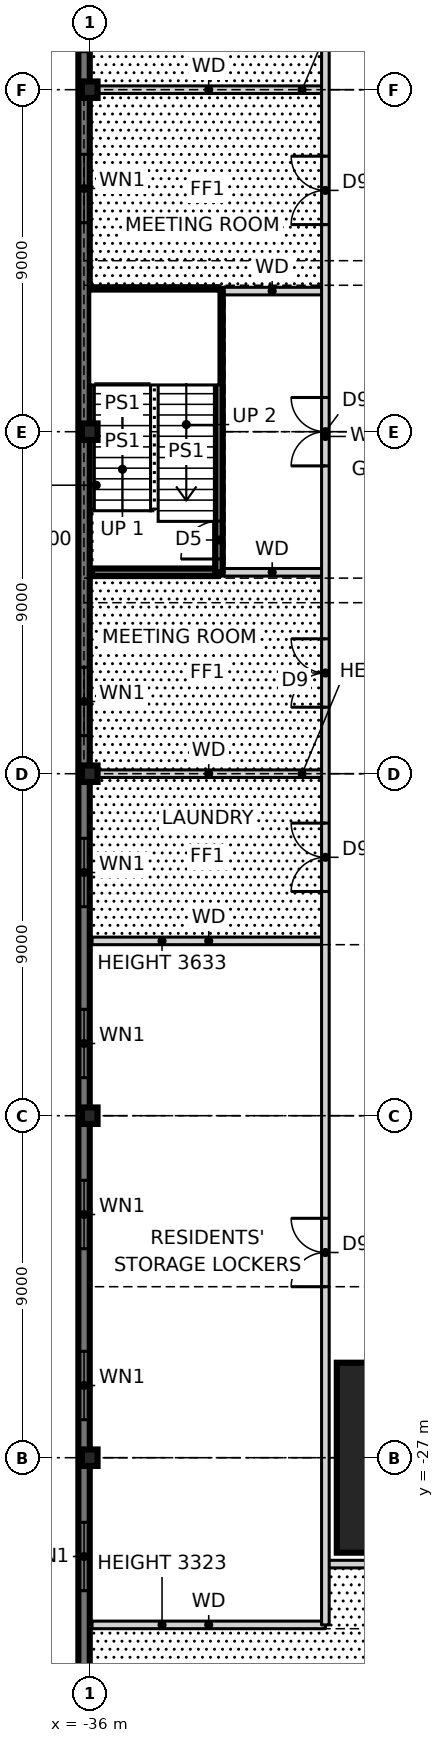
"""IFC4 building model, lengths in metres.
Left out: names, types, materials, properties, quantities, classifications, styles, units other than length and angle.
Written with IfcOpenShell. Run it as: python <this file> out.ifc"""

import sys

from ifc_helpers import new_model, si_unit, direction, frame, frame_2d, origin, origin_2d, place, context, subcontext, project, spatial, rectangle, i_section, extrude, element, fill, save


model = new_model("IFC4")
c1 = context("Model", 3, precision=1e-05, world=origin(), true_north=direction((0.0, 1.0)))
c2 = subcontext(c1, "Body", "Model", "MODEL_VIEW")
j1 = project(units=[si_unit("LENGTHUNIT", "METRE"), si_unit("PLANEANGLEUNIT", "RADIAN")], contexts=[c1])
p1 = place(None, origin())
s1 = spatial("IfcSite", under=j1, at=p1, CompositionType="ELEMENT")
p2 = place(p1, origin())
s2 = spatial("IfcBuilding", under=s1, at=p2, CompositionType="ELEMENT")
p3 = place(p2, frame((0.0, 0.0, 6.0)))
s3 = spatial("IfcBuildingStorey", under=s2, at=p3, CompositionType="ELEMENT", Elevation=6.0)
p4 = place(p3, frame((-27.0, -27.0, 0.0), z_axis=(0.0, 0.0, 1.0), x_axis=(1.0, 0.0, 0.0)))
e1 = element("IfcColumn", 1, at=p4, inside=s3, PredefinedType="COLUMN", context=c2, shape_type="SweptSolid", body=[
    extrude(rectangle(XDim=5.0, YDim=5.0, at=origin_2d()), origin(), (0.0, 0.0, 1.0), 4.5),
    extrude(i_section(OverallWidth=0.478, OverallDepth=0.599, WebThickness=0.1, FlangeThickness=0.14, at=origin_2d()), origin(), (0.0, 0.0, 1.0), 4.5),
])
for number, where, z_axis, x_axis in (
    (2, (-36.0, -27.0, 0.0), (0.0, 0.0, 1.0), (1.0, 0.0, 0.0)),
    (3, (-36.0, -18.0, 0.0), (0.0, 0.0, 1.0), (1.0, 0.0, 0.0)),
    (4, (-36.0, -9.0, 0.0), (0.0, 0.0, 1.0), (1.0, 0.0, 0.0)),
    (5, (-36.0, 0.0, 0.0), (0.0, 0.0, 1.0), (1.0, 0.0, 0.0)),
    (6, (-36.0, 9.0, 0.0), (0.0, 0.0, 1.0), (1.0, 0.0, 0.0)),
):
    element("IfcColumn", number, at=place(p3, frame(where, z_axis=z_axis, x_axis=x_axis)), inside=s3, PredefinedType="COLUMN", context=c2, shape_type="SweptSolid", body=[
        extrude(i_section(OverallWidth=0.411, OverallDepth=0.434, WebThickness=0.036, FlangeThickness=0.057, at=origin_2d()), origin(), (0.0, 0.0, 1.0), 4.5),
    ])
p5 = place(p3, frame((-36.15, 36.3, -0.25), z_axis=(0.0, 0.0, 1.0), x_axis=(0.0, -1.0, 0.0)))
e7 = element("IfcWall", 7, at=p5, inside=s3, PredefinedType="SOLIDWALL", context=c2, shape_type="SweptSolid", body=[
    extrude(rectangle(XDim=72.6, YDim=0.3, at=frame_2d((36.3, 0.0))), origin(), (0.0, 0.0, 1.0), 3.73),
])
p6 = place(p5, frame((2.0, 0.0, 1.15)))
e8 = element("IfcOpeningElement", 8, at=p6, cuts=e7, PredefinedType="OPENING", context=c2, shape_type="SweptSolid", body=[
    extrude(rectangle(XDim=1.8, YDim=2.4, at=frame_2d((0.9, 1.2))), frame((0.0, 0.16, 0.0), z_axis=(0.0, -1.0, 0.0), x_axis=(1.0, 0.0, 0.0)), (0.0, 0.0, 1.0), 0.32),
])
p7 = place(p5, frame((6.5, 0.0, 1.15)))
e9 = element("IfcOpeningElement", 9, at=p7, cuts=e7, PredefinedType="OPENING", context=c2, shape_type="SweptSolid", body=[
    extrude(rectangle(XDim=1.8, YDim=2.4, at=frame_2d((0.9, 1.2))), frame((0.0, 0.16, 0.0), z_axis=(0.0, -1.0, 0.0), x_axis=(1.0, 0.0, 0.0)), (0.0, 0.0, 1.0), 0.32),
])
p8 = place(p5, frame((11.0, 0.0, 1.15)))
e10 = element("IfcOpeningElement", 10, at=p8, cuts=e7, PredefinedType="OPENING", context=c2, shape_type="SweptSolid", body=[
    extrude(rectangle(XDim=1.8, YDim=2.4, at=frame_2d((0.9, 1.2))), frame((0.0, 0.16, 0.0), z_axis=(0.0, -1.0, 0.0), x_axis=(1.0, 0.0, 0.0)), (0.0, 0.0, 1.0), 0.32),
])
p9 = place(p5, frame((15.5, 0.0, 1.15)))
e11 = element("IfcOpeningElement", 11, at=p9, cuts=e7, PredefinedType="OPENING", context=c2, shape_type="SweptSolid", body=[
    extrude(rectangle(XDim=1.8, YDim=2.4, at=frame_2d((0.9, 1.2))), frame((0.0, 0.16, 0.0), z_axis=(0.0, -1.0, 0.0), x_axis=(1.0, 0.0, 0.0)), (0.0, 0.0, 1.0), 0.32),
])
p10 = place(p5, frame((20.0, 0.0, 1.15)))
e12 = element("IfcOpeningElement", 12, at=p10, cuts=e7, PredefinedType="OPENING", context=c2, shape_type="SweptSolid", body=[
    extrude(rectangle(XDim=1.8, YDim=2.4, at=frame_2d((0.9, 1.2))), frame((0.0, 0.16, 0.0), z_axis=(0.0, -1.0, 0.0), x_axis=(1.0, 0.0, 0.0)), (0.0, 0.0, 1.0), 0.32),
])
p11 = place(p5, frame((24.5, 0.0, 1.15)))
e13 = element("IfcOpeningElement", 13, at=p11, cuts=e7, PredefinedType="OPENING", context=c2, shape_type="SweptSolid", body=[
    extrude(rectangle(XDim=1.8, YDim=2.4, at=frame_2d((0.9, 1.2))), frame((0.0, 0.16, 0.0), z_axis=(0.0, -1.0, 0.0), x_axis=(1.0, 0.0, 0.0)), (0.0, 0.0, 1.0), 0.32),
])
p12 = place(p5, frame((29.0, 0.0, 1.15)))
e14 = element("IfcOpeningElement", 14, at=p12, cuts=e7, PredefinedType="OPENING", context=c2, shape_type="SweptSolid", body=[
    extrude(rectangle(XDim=1.8, YDim=2.4, at=frame_2d((0.9, 1.2))), frame((0.0, 0.16, 0.0), z_axis=(0.0, -1.0, 0.0), x_axis=(1.0, 0.0, 0.0)), (0.0, 0.0, 1.0), 0.32),
])
p13 = place(p5, frame((42.5, 0.0, 1.15)))
e15 = element("IfcOpeningElement", 15, at=p13, cuts=e7, PredefinedType="OPENING", context=c2, shape_type="SweptSolid", body=[
    extrude(rectangle(XDim=1.8, YDim=2.4, at=frame_2d((0.9, 1.2))), frame((0.0, 0.16, 0.0), z_axis=(0.0, -1.0, 0.0), x_axis=(1.0, 0.0, 0.0)), (0.0, 0.0, 1.0), 0.32),
])
p14 = place(p5, frame((47.0, 0.0, 1.15)))
e16 = element("IfcOpeningElement", 16, at=p14, cuts=e7, PredefinedType="OPENING", context=c2, shape_type="SweptSolid", body=[
    extrude(rectangle(XDim=1.8, YDim=2.4, at=frame_2d((0.9, 1.2))), frame((0.0, 0.16, 0.0), z_axis=(0.0, -1.0, 0.0), x_axis=(1.0, 0.0, 0.0)), (0.0, 0.0, 1.0), 0.32),
])
p15 = place(p5, frame((51.5, 0.0, 1.15)))
e17 = element("IfcOpeningElement", 17, at=p15, cuts=e7, PredefinedType="OPENING", context=c2, shape_type="SweptSolid", body=[
    extrude(rectangle(XDim=1.8, YDim=2.4, at=frame_2d((0.9, 1.2))), frame((0.0, 0.16, 0.0), z_axis=(0.0, -1.0, 0.0), x_axis=(1.0, 0.0, 0.0)), (0.0, 0.0, 1.0), 0.32),
])
p16 = place(p5, frame((56.0, 0.0, 1.15)))
e18 = element("IfcOpeningElement", 18, at=p16, cuts=e7, PredefinedType="OPENING", context=c2, shape_type="SweptSolid", body=[
    extrude(rectangle(XDim=1.8, YDim=2.4, at=frame_2d((0.9, 1.2))), frame((0.0, 0.16, 0.0), z_axis=(0.0, -1.0, 0.0), x_axis=(1.0, 0.0, 0.0)), (0.0, 0.0, 1.0), 0.32),
])
p17 = place(p5, frame((60.5, 0.0, 1.15)))
e19 = element("IfcOpeningElement", 19, at=p17, cuts=e7, PredefinedType="OPENING", context=c2, shape_type="SweptSolid", body=[
    extrude(rectangle(XDim=1.8, YDim=2.4, at=frame_2d((0.9, 1.2))), frame((0.0, 0.16, 0.0), z_axis=(0.0, -1.0, 0.0), x_axis=(1.0, 0.0, 0.0)), (0.0, 0.0, 1.0), 0.32),
])
p18 = place(p5, frame((65.0, 0.0, 1.15)))
e20 = element("IfcOpeningElement", 20, at=p18, cuts=e7, PredefinedType="OPENING", context=c2, shape_type="SweptSolid", body=[
    extrude(rectangle(XDim=1.8, YDim=2.4, at=frame_2d((0.9, 1.2))), frame((0.0, 0.16, 0.0), z_axis=(0.0, -1.0, 0.0), x_axis=(1.0, 0.0, 0.0)), (0.0, 0.0, 1.0), 0.32),
])
p19 = place(p5, frame((69.5, 0.0, 1.15)))
e21 = element("IfcOpeningElement", 21, at=p19, cuts=e7, PredefinedType="OPENING", context=c2, shape_type="SweptSolid", body=[
    extrude(rectangle(XDim=1.8, YDim=2.4, at=frame_2d((0.9, 1.2))), frame((0.0, 0.16, 0.0), z_axis=(0.0, -1.0, 0.0), x_axis=(1.0, 0.0, 0.0)), (0.0, 0.0, 1.0), 0.32),
])
p20 = place(p3, frame((-35.94, -31.4, 0.0), z_axis=(0.0, 0.0, 1.0), x_axis=(1.0, 0.0, 0.0)))
e22 = element("IfcWall", 22, at=p20, inside=s3, PredefinedType="SOLIDWALL", context=c2, shape_type="SweptSolid", body=[
    extrude(rectangle(XDim=6.14, YDim=0.2, at=frame_2d((3.07, 0.0))), origin(), (0.0, 0.0, 1.0), 3.323),
])
p21 = place(p3, frame((-29.8, -29.8, 0.0), z_axis=(0.0, 0.0, 1.0), x_axis=(1.0, 0.0, 0.0)))
e23 = element("IfcWall", 23, at=p21, inside=s3, PredefinedType="SOLIDWALL", context=c2, shape_type="SweptSolid", body=[
    extrude(rectangle(XDim=59.6, YDim=0.2, at=frame_2d((29.8, 0.0))), origin(), (0.0, 0.0, 1.0), 4.25),
])
p22 = place(p21, frame((8.1, 0.0, 0.0)))
e24 = element("IfcOpeningElement", 24, at=p22, cuts=e23, PredefinedType="OPENING", context=c2, shape_type="SweptSolid", body=[
    extrude(rectangle(XDim=1.8, YDim=2.1, at=frame_2d((0.9, 1.05))), frame((0.0, 0.11, 0.0), z_axis=(0.0, -1.0, 0.0), x_axis=(1.0, 0.0, 0.0)), (0.0, 0.0, 1.0), 0.22),
])
p23 = place(p21, frame((22.9, 0.0, 0.0)))
e25 = element("IfcOpeningElement", 25, at=p23, cuts=e23, PredefinedType="OPENING", context=c2, shape_type="SweptSolid", body=[
    extrude(rectangle(XDim=1.8, YDim=2.1, at=frame_2d((0.9, 1.05))), frame((0.0, 0.11, 0.0), z_axis=(0.0, -1.0, 0.0), x_axis=(1.0, 0.0, 0.0)), (0.0, 0.0, 1.0), 0.22),
])
p24 = place(p21, frame((28.9, 0.0, 0.0)))
e26 = element("IfcOpeningElement", 26, at=p24, cuts=e23, PredefinedType="OPENING", context=c2, shape_type="SweptSolid", body=[
    extrude(rectangle(XDim=1.8, YDim=2.1, at=frame_2d((0.9, 1.05))), frame((0.0, 0.11, 0.0), z_axis=(0.0, -1.0, 0.0), x_axis=(1.0, 0.0, 0.0)), (0.0, 0.0, 1.0), 0.22),
])
p25 = place(p21, frame((33.2, 0.0, 0.0)))
e27 = element("IfcOpeningElement", 27, at=p25, cuts=e23, PredefinedType="OPENING", context=c2, shape_type="SweptSolid", body=[
    extrude(rectangle(XDim=1.8, YDim=2.1, at=frame_2d((0.9, 1.05))), frame((0.0, 0.11, 0.0), z_axis=(0.0, -1.0, 0.0), x_axis=(1.0, 0.0, 0.0)), (0.0, 0.0, 1.0), 0.22),
])
p26 = place(p21, frame((41.0, 0.0, 0.0)))
e28 = element("IfcOpeningElement", 28, at=p26, cuts=e23, PredefinedType="OPENING", context=c2, shape_type="SweptSolid", body=[
    extrude(rectangle(XDim=1.8, YDim=2.1, at=frame_2d((0.9, 1.05))), frame((0.0, 0.11, 0.0), z_axis=(0.0, -1.0, 0.0), x_axis=(1.0, 0.0, 0.0)), (0.0, 0.0, 1.0), 0.22),
])
p27 = place(p21, frame((50.2, 0.0, 0.0)))
e29 = element("IfcOpeningElement", 29, at=p27, cuts=e23, PredefinedType="OPENING", context=c2, shape_type="SweptSolid", body=[
    extrude(rectangle(XDim=1.8, YDim=2.1, at=frame_2d((0.9, 1.05))), frame((0.0, 0.11, 0.0), z_axis=(0.0, -1.0, 0.0), x_axis=(1.0, 0.0, 0.0)), (0.0, 0.0, 1.0), 0.22),
])
p28 = place(p3, frame((-35.94, -13.4, 0.0), z_axis=(0.0, 0.0, 1.0), x_axis=(1.0, 0.0, 0.0)))
e30 = element("IfcWall", 30, at=p28, inside=s3, PredefinedType="SOLIDWALL", context=c2, shape_type="SweptSolid", body=[
    extrude(rectangle(XDim=6.14, YDim=0.2, at=frame_2d((3.07, 0.0))), origin(), (0.0, 0.0, 1.0), 3.633),
])
p29 = place(p3, frame((-35.94, -9.0, 0.0), z_axis=(0.0, 0.0, 1.0), x_axis=(1.0, 0.0, 0.0)))
e31 = element("IfcWall", 31, at=p29, inside=s3, PredefinedType="SOLIDWALL", context=c2, shape_type="SweptSolid", body=[
    extrude(rectangle(XDim=6.14, YDim=0.2, at=frame_2d((3.07, 0.0))), origin(), (0.0, 0.0, 1.0), 3.48),
])
p30 = place(p3, frame((-35.94, -3.7, 0.0), z_axis=(0.0, 0.0, 1.0), x_axis=(1.0, 0.0, 0.0)))
e32 = element("IfcWall", 32, at=p30, inside=s3, PredefinedType="SOLIDWALL", context=c2, shape_type="SweptSolid", body=[
    extrude(rectangle(XDim=3.34, YDim=0.2, at=frame_2d((1.67, 0.0))), origin(), (0.0, 0.0, 1.0), 4.5),
])
p31 = place(p3, frame((-32.6, -3.7, 0.0), z_axis=(0.0, 0.0, 1.0), x_axis=(1.0, 0.0, 0.0)))
e33 = element("IfcWall", 33, at=p31, inside=s3, PredefinedType="SOLIDWALL", context=c2, shape_type="SweptSolid", body=[
    extrude(rectangle(XDim=2.8, YDim=0.2, at=frame_2d((1.4, 0.0))), origin(), (0.0, 0.0, 1.0), 4.25),
])
p32 = place(p3, frame((-35.94, 3.7, 0.0), z_axis=(0.0, 0.0, 1.0), x_axis=(1.0, 0.0, 0.0)))
e34 = element("IfcWall", 34, at=p32, inside=s3, PredefinedType="SOLIDWALL", context=c2, shape_type="SweptSolid", body=[
    extrude(rectangle(XDim=3.34, YDim=0.2, at=frame_2d((1.67, 0.0))), origin(), (0.0, 0.0, 1.0), 4.5),
])
p33 = place(p3, frame((-32.6, 3.7, 0.0), z_axis=(0.0, 0.0, 1.0), x_axis=(1.0, 0.0, 0.0)))
e35 = element("IfcWall", 35, at=p33, inside=s3, PredefinedType="SOLIDWALL", context=c2, shape_type="SweptSolid", body=[
    extrude(rectangle(XDim=2.8, YDim=0.2, at=frame_2d((1.4, 0.0))), origin(), (0.0, 0.0, 1.0), 4.25),
])
p34 = place(p3, frame((-35.94, 9.0, 0.0), z_axis=(0.0, 0.0, 1.0), x_axis=(1.0, 0.0, 0.0)))
e36 = element("IfcWall", 36, at=p34, inside=s3, PredefinedType="SOLIDWALL", context=c2, shape_type="SweptSolid", body=[
    extrude(rectangle(XDim=6.14, YDim=0.2, at=frame_2d((3.07, 0.0))), origin(), (0.0, 0.0, 1.0), 3.48),
])
p35 = place(p3, frame((-29.8, -31.4, 0.0), z_axis=(0.0, 0.0, 1.0), x_axis=(0.0, 1.0, 0.0)))
e37 = element("IfcWall", 37, at=p35, inside=s3, PredefinedType="SOLIDWALL", context=c2, shape_type="SweptSolid", body=[
    extrude(rectangle(XDim=62.55, YDim=0.2, at=frame_2d((31.275, 0.0))), origin(), (0.0, 0.0, 1.0), 4.25),
])
p36 = place(p35, frame((8.9, 0.0, 0.0)))
e38 = element("IfcOpeningElement", 38, at=p36, cuts=e37, PredefinedType="OPENING", context=c2, shape_type="SweptSolid", body=[
    extrude(rectangle(XDim=1.8, YDim=2.1, at=frame_2d((0.9, 1.05))), frame((0.0, 0.11, 0.0), z_axis=(0.0, -1.0, 0.0), x_axis=(1.0, 0.0, 0.0)), (0.0, 0.0, 1.0), 0.22),
])
p37 = place(p35, frame((19.3, 0.0, 0.0)))
e39 = element("IfcOpeningElement", 39, at=p37, cuts=e37, PredefinedType="OPENING", context=c2, shape_type="SweptSolid", body=[
    extrude(rectangle(XDim=1.8, YDim=2.1, at=frame_2d((0.9, 1.05))), frame((0.0, 0.11, 0.0), z_axis=(0.0, -1.0, 0.0), x_axis=(1.0, 0.0, 0.0)), (0.0, 0.0, 1.0), 0.22),
])
p38 = place(p35, frame((24.15, 0.0, 0.0)))
e40 = element("IfcOpeningElement", 40, at=p38, cuts=e37, PredefinedType="OPENING", context=c2, shape_type="SweptSolid", body=[
    extrude(rectangle(XDim=1.8, YDim=2.1, at=frame_2d((0.9, 1.05))), frame((0.0, 0.11, 0.0), z_axis=(0.0, -1.0, 0.0), x_axis=(1.0, 0.0, 0.0)), (0.0, 0.0, 1.0), 0.22),
])
p39 = place(p35, frame((30.5, 0.0, 0.0)))
e41 = element("IfcOpeningElement", 41, at=p39, cuts=e37, PredefinedType="OPENING", context=c2, shape_type="SweptSolid", body=[
    extrude(rectangle(XDim=1.8, YDim=2.1, at=frame_2d((0.9, 1.05))), frame((0.0, 0.11, 0.0), z_axis=(0.0, -1.0, 0.0), x_axis=(1.0, 0.0, 0.0)), (0.0, 0.0, 1.0), 0.22),
])
p40 = place(p35, frame((36.85, 0.0, 0.0)))
e42 = element("IfcOpeningElement", 42, at=p40, cuts=e37, PredefinedType="OPENING", context=c2, shape_type="SweptSolid", body=[
    extrude(rectangle(XDim=1.8, YDim=2.1, at=frame_2d((0.9, 1.05))), frame((0.0, 0.11, 0.0), z_axis=(0.0, -1.0, 0.0), x_axis=(1.0, 0.0, 0.0)), (0.0, 0.0, 1.0), 0.22),
])
p41 = place(p35, frame((51.3, 0.0, 0.0)))
e43 = element("IfcOpeningElement", 43, at=p41, cuts=e37, PredefinedType="OPENING", context=c2, shape_type="SweptSolid", body=[
    extrude(rectangle(XDim=1.8, YDim=2.1, at=frame_2d((0.9, 1.05))), frame((0.0, 0.11, 0.0), z_axis=(0.0, -1.0, 0.0), x_axis=(1.0, 0.0, 0.0)), (0.0, 0.0, 1.0), 0.22),
])
p42 = place(p3, frame((-32.6, -3.7, 0.0), z_axis=(0.0, 0.0, 1.0), x_axis=(0.0, 1.0, 0.0)))
e44 = element("IfcWall", 44, at=p42, inside=s3, PredefinedType="SOLIDWALL", context=c2, shape_type="SweptSolid", body=[
    extrude(rectangle(XDim=7.4, YDim=0.2, at=frame_2d((3.7, 0.0))), origin(), (0.0, 0.0, 1.0), 4.5),
])
p43 = place(p42, frame((0.35, 0.0, 0.0)))
e45 = element("IfcOpeningElement", 45, at=p43, cuts=e44, PredefinedType="OPENING", context=c2, shape_type="SweptSolid", body=[
    extrude(rectangle(XDim=1.0, YDim=2.1, at=frame_2d((0.5, 1.05))), frame((0.0, 0.11, 0.0), z_axis=(0.0, -1.0, 0.0), x_axis=(1.0, 0.0, 0.0)), (0.0, 0.0, 1.0), 0.22),
])
p44 = place(p12, origin())
e46 = element("IfcWindow", 46, at=p44, inside=s3, PartitioningType="SINGLE_PANEL", PredefinedType="WINDOW", context=c2, shape_type="SweptSolid", body=[
    extrude(rectangle(XDim=1.8, YDim=2.4, at=frame_2d((0.9, 1.2))), frame((0.0, 0.03, 0.0), z_axis=(0.0, -1.0, 0.0), x_axis=(1.0, 0.0, 0.0)), (0.0, 0.0, 1.0), 0.06),
])
fill(e14, e46)
p45 = place(p13, origin())
e47 = element("IfcWindow", 47, at=p45, inside=s3, PartitioningType="SINGLE_PANEL", PredefinedType="WINDOW", context=c2, shape_type="SweptSolid", body=[
    extrude(rectangle(XDim=1.8, YDim=2.4, at=frame_2d((0.9, 1.2))), frame((0.0, 0.03, 0.0), z_axis=(0.0, -1.0, 0.0), x_axis=(1.0, 0.0, 0.0)), (0.0, 0.0, 1.0), 0.06),
])
fill(e15, e47)
p46 = place(p14, origin())
e48 = element("IfcWindow", 48, at=p46, inside=s3, PartitioningType="SINGLE_PANEL", PredefinedType="WINDOW", context=c2, shape_type="SweptSolid", body=[
    extrude(rectangle(XDim=1.8, YDim=2.4, at=frame_2d((0.9, 1.2))), frame((0.0, 0.03, 0.0), z_axis=(0.0, -1.0, 0.0), x_axis=(1.0, 0.0, 0.0)), (0.0, 0.0, 1.0), 0.06),
])
fill(e16, e48)
p47 = place(p15, origin())
e49 = element("IfcWindow", 49, at=p47, inside=s3, PartitioningType="SINGLE_PANEL", PredefinedType="WINDOW", context=c2, shape_type="SweptSolid", body=[
    extrude(rectangle(XDim=1.8, YDim=2.4, at=frame_2d((0.9, 1.2))), frame((0.0, 0.03, 0.0), z_axis=(0.0, -1.0, 0.0), x_axis=(1.0, 0.0, 0.0)), (0.0, 0.0, 1.0), 0.06),
])
fill(e17, e49)
p48 = place(p16, origin())
e50 = element("IfcWindow", 50, at=p48, inside=s3, PartitioningType="SINGLE_PANEL", PredefinedType="WINDOW", context=c2, shape_type="SweptSolid", body=[
    extrude(rectangle(XDim=1.8, YDim=2.4, at=frame_2d((0.9, 1.2))), frame((0.0, 0.03, 0.0), z_axis=(0.0, -1.0, 0.0), x_axis=(1.0, 0.0, 0.0)), (0.0, 0.0, 1.0), 0.06),
])
fill(e18, e50)
p49 = place(p17, origin())
e51 = element("IfcWindow", 51, at=p49, inside=s3, PartitioningType="SINGLE_PANEL", PredefinedType="WINDOW", context=c2, shape_type="SweptSolid", body=[
    extrude(rectangle(XDim=1.8, YDim=2.4, at=frame_2d((0.9, 1.2))), frame((0.0, 0.03, 0.0), z_axis=(0.0, -1.0, 0.0), x_axis=(1.0, 0.0, 0.0)), (0.0, 0.0, 1.0), 0.06),
])
fill(e19, e51)
p50 = place(p18, origin())
e52 = element("IfcWindow", 52, at=p50, inside=s3, PartitioningType="SINGLE_PANEL", PredefinedType="WINDOW", context=c2, shape_type="SweptSolid", body=[
    extrude(rectangle(XDim=1.8, YDim=2.4, at=frame_2d((0.9, 1.2))), frame((0.0, 0.03, 0.0), z_axis=(0.0, -1.0, 0.0), x_axis=(1.0, 0.0, 0.0)), (0.0, 0.0, 1.0), 0.06),
])
fill(e20, e52)
p51 = place(p36, origin())
e53 = element("IfcDoor", 53, at=p51, inside=s3, OperationType="DOUBLE_DOOR_SINGLE_SWING", PredefinedType="DOOR", context=c2, shape_type="SweptSolid", body=[
    extrude(rectangle(XDim=1.8, YDim=2.1, at=frame_2d((0.9, 1.05))), frame((0.0, 0.025, 0.0), z_axis=(0.0, -1.0, 0.0), x_axis=(1.0, 0.0, 0.0)), (0.0, 0.0, 1.0), 0.05),
])
fill(e38, e53)
p52 = place(p37, origin())
e54 = element("IfcDoor", 54, at=p52, inside=s3, OperationType="DOUBLE_DOOR_SINGLE_SWING", PredefinedType="DOOR", context=c2, shape_type="SweptSolid", body=[
    extrude(rectangle(XDim=1.8, YDim=2.1, at=frame_2d((0.9, 1.05))), frame((0.0, 0.025, 0.0), z_axis=(0.0, -1.0, 0.0), x_axis=(1.0, 0.0, 0.0)), (0.0, 0.0, 1.0), 0.05),
])
fill(e39, e54)
p53 = place(p38, origin())
e55 = element("IfcDoor", 55, at=p53, inside=s3, OperationType="DOUBLE_DOOR_SINGLE_SWING", PredefinedType="DOOR", context=c2, shape_type="SweptSolid", body=[
    extrude(rectangle(XDim=1.8, YDim=2.1, at=frame_2d((0.9, 1.05))), frame((0.0, 0.025, 0.0), z_axis=(0.0, -1.0, 0.0), x_axis=(1.0, 0.0, 0.0)), (0.0, 0.0, 1.0), 0.05),
])
fill(e40, e55)
p54 = place(p39, origin())
e56 = element("IfcDoor", 56, at=p54, inside=s3, OperationType="DOUBLE_DOOR_SINGLE_SWING", PredefinedType="DOOR", context=c2, shape_type="SweptSolid", body=[
    extrude(rectangle(XDim=1.8, YDim=2.1, at=frame_2d((0.9, 1.05))), frame((0.0, 0.025, 0.0), z_axis=(0.0, -1.0, 0.0), x_axis=(1.0, 0.0, 0.0)), (0.0, 0.0, 1.0), 0.05),
])
fill(e41, e56)
p55 = place(p40, origin())
e57 = element("IfcDoor", 57, at=p55, inside=s3, OperationType="DOUBLE_DOOR_SINGLE_SWING", PredefinedType="DOOR", context=c2, shape_type="SweptSolid", body=[
    extrude(rectangle(XDim=1.8, YDim=2.1, at=frame_2d((0.9, 1.05))), frame((0.0, 0.025, 0.0), z_axis=(0.0, -1.0, 0.0), x_axis=(1.0, 0.0, 0.0)), (0.0, 0.0, 1.0), 0.05),
])
fill(e42, e57)
p56 = place(p43, origin())
e58 = element("IfcDoor", 58, at=p56, inside=s3, OperationType="SINGLE_SWING_LEFT", PredefinedType="DOOR", context=c2, shape_type="SweptSolid", body=[
    extrude(rectangle(XDim=1.0, YDim=2.1, at=frame_2d((0.5, 1.05))), frame((0.0, 0.025, 0.0), z_axis=(0.0, -1.0, 0.0), x_axis=(1.0, 0.0, 0.0)), (0.0, 0.0, 1.0), 0.05),
])
fill(e45, e58)
save(model, sys.argv[1])
